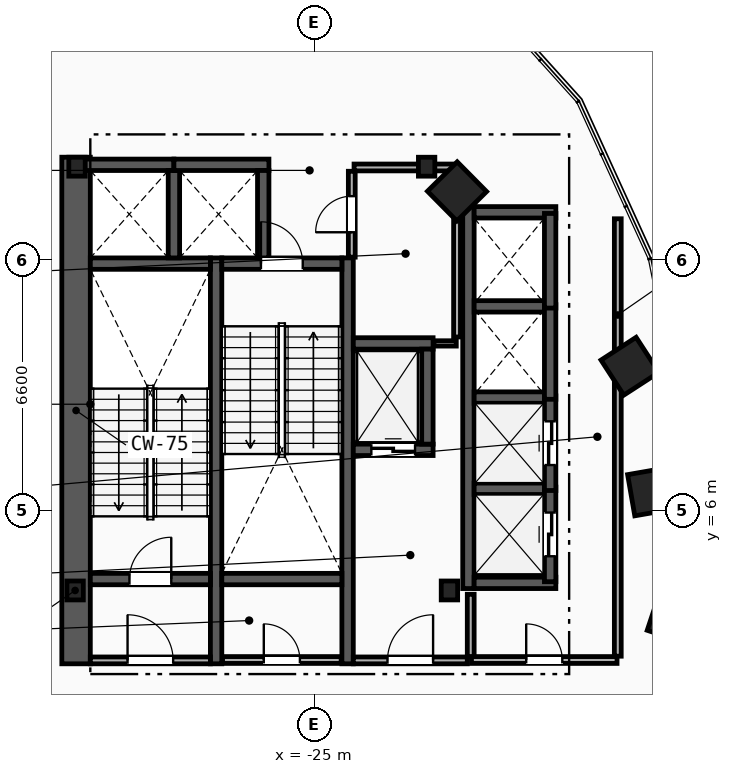
"""IFC4 building model, lengths in metres.
Left out: names, types, materials, properties, quantities, classifications, styles, units other than length and angle.
Written with IfcOpenShell. Run it as: python <this file> out.ifc"""

import sys

from ifc_helpers import new_model, si_unit, direction, frame, frame_2d, origin, origin_2d, place, context, subcontext, project, spatial, rectangle, i_section, extrude, element, fill, save


model = new_model("IFC4")
c1 = context("Model", 3, precision=1e-05, world=origin(), true_north=direction((0.0, 1.0)))
c2 = subcontext(c1, "Body", "Model", "MODEL_VIEW")
j1 = project(units=[si_unit("LENGTHUNIT", "METRE"), si_unit("PLANEANGLEUNIT", "RADIAN")], contexts=[c1])
p1 = place(None, origin())
s1 = spatial("IfcSite", under=j1, at=p1, CompositionType="ELEMENT")
p2 = place(p1, origin())
s2 = spatial("IfcBuilding", under=s1, at=p2, CompositionType="ELEMENT")
p3 = place(p2, frame((0.0, 0.0, 77.2)))
s3 = spatial("IfcBuildingStorey", under=s2, at=p3, CompositionType="ELEMENT", Elevation=77.2)
for number, where, z_axis, x_axis in (
    (1, (-31.3, 3.9, 0.0), (0.0, 0.0, 1.0), (1.0, 0.0, 0.0)),
    (2, (-21.45, 3.9, 0.0), (0.0, 0.0, 1.0), (1.0, 0.0, 0.0)),
    (3, (-22.05, 15.05, 0.0), (0.0, 0.0, 1.0), (1.0, 0.0, 0.0)),
    (4, (-31.25, 15.05, 0.0), (0.0, 0.0, 1.0), (1.0, 0.0, 0.0)),
):
    element("IfcColumn", number, at=place(p3, frame(where, z_axis=z_axis, x_axis=x_axis)), inside=s3, PredefinedType="COLUMN", context=c2, shape_type="SweptSolid", body=[
        extrude(i_section(OverallWidth=0.432, OverallDepth=0.498, WebThickness=0.056, FlangeThickness=0.089, FilletRadius=0.018, at=origin_2d()), origin(), (0.0, 0.0, 1.0), 4.6),
    ])
for number, where, z_axis, x_axis in (
    (5, (-15.55, 3.2, 0.0), (0.0, 0.0, 1.0), (0.315, 0.949, 0.0)),
    (6, (-16.125, 6.5, 0.0), (0.0, 0.0, 1.0), (-0.172, 0.985, 0.0)),
    (7, (-16.7, 9.8, 0.0), (0.0, 0.0, 1.0), (-0.544, 0.839, 0.0)),
    (8, (-21.25, 14.4, 0.0), (0.0, 0.0, 1.0), (-0.703, 0.711, 0.0)),
):
    element("IfcColumn", number, at=place(p3, frame(where, z_axis=z_axis, x_axis=x_axis)), inside=s3, PredefinedType="COLUMN", context=c2, shape_type="SweptSolid", body=[
        extrude(rectangle(XDim=1.1, YDim=1.1, at=origin_2d()), origin(), (0.0, 0.0, 1.0), 4.6),
    ])
p4 = place(p3, frame((-31.275, 1.97, 0.0), z_axis=(0.0, 0.0, 1.0), x_axis=(0.0, 1.0, 0.0)))
e9 = element("IfcWall", 9, at=p4, inside=s3, PredefinedType="SHEAR", context=c2, shape_type="SweptSolid", body=[
    extrude(rectangle(XDim=13.33, YDim=0.75, at=frame_2d((6.665, 0.0))), origin(), (0.0, 0.0, 1.0), 4.3),
])
for number, where, z_axis, x_axis in (
    (10, (-27.59, 1.97, 0.0), (0.0, 0.0, 1.0), (0.0, 1.0, 0.0)),
    (11, (-24.13, 1.97, 0.0), (0.0, 0.0, 1.0), (0.0, 1.0, 0.0)),
):
    element("IfcWall", number, at=place(p3, frame(where, z_axis=z_axis, x_axis=x_axis)), inside=s3, PredefinedType="SHEAR", context=c2, shape_type="SweptSolid", body=[
        extrude(rectangle(XDim=10.68, YDim=0.3, at=frame_2d((5.34, 0.0))), origin(), (0.0, 0.0, 1.0), 4.3),
    ])
p5 = place(p3, frame((-30.9, 4.2, 0.0), z_axis=(0.0, 0.0, 1.0), x_axis=(1.0, 0.0, 0.0)))
e12 = element("IfcWall", 12, at=p5, inside=s3, PredefinedType="SHEAR", context=c2, shape_type="SweptSolid", body=[
    extrude(rectangle(XDim=3.16, YDim=0.3, at=frame_2d((1.58, 0.0))), origin(), (0.0, 0.0, 1.0), 4.3),
])
p6 = place(p5, frame((1.03, 0.0, 0.0)))
e13 = element("IfcOpeningElement", 13, at=p6, cuts=e12, PredefinedType="OPENING", context=c2, shape_type="SweptSolid", body=[
    extrude(rectangle(XDim=1.1, YDim=2.15, at=frame_2d((0.55, 1.075))), frame((0.0, 0.16, 0.0), z_axis=(0.0, -1.0, 0.0), x_axis=(1.0, 0.0, 0.0)), (0.0, 0.0, 1.0), 0.32),
])
p7 = place(p3, frame((-30.9, 12.5, 0.0), z_axis=(0.0, 0.0, 1.0), x_axis=(1.0, 0.0, 0.0)))
e14 = element("IfcWall", 14, at=p7, inside=s3, PredefinedType="SHEAR", context=c2, shape_type="SweptSolid", body=[
    extrude(rectangle(XDim=3.16, YDim=0.3, at=frame_2d((1.58, 0.0))), origin(), (0.0, 0.0, 1.0), 4.3),
])
p8 = place(p3, frame((-27.44, 12.5, 0.0), z_axis=(0.0, 0.0, 1.0), x_axis=(1.0, 0.0, 0.0)))
e15 = element("IfcWall", 15, at=p8, inside=s3, PredefinedType="SHEAR", context=c2, shape_type="SweptSolid", body=[
    extrude(rectangle(XDim=3.16, YDim=0.3, at=frame_2d((1.58, 0.0))), origin(), (0.0, 0.0, 1.0), 4.3),
])
p9 = place(p8, frame((1.03, 0.0, 0.0)))
e16 = element("IfcOpeningElement", 16, at=p9, cuts=e15, PredefinedType="OPENING", context=c2, shape_type="SweptSolid", body=[
    extrude(rectangle(XDim=1.1, YDim=2.15, at=frame_2d((0.55, 1.075))), frame((0.0, 0.16, 0.0), z_axis=(0.0, -1.0, 0.0), x_axis=(1.0, 0.0, 0.0)), (0.0, 0.0, 1.0), 0.32),
])
p10 = place(p3, frame((-27.44, 4.2, 0.0), z_axis=(0.0, 0.0, 1.0), x_axis=(1.0, 0.0, 0.0)))
e17 = element("IfcWall", 17, at=p10, inside=s3, PredefinedType="SHEAR", context=c2, shape_type="SweptSolid", body=[
    extrude(rectangle(XDim=3.16, YDim=0.3, at=frame_2d((1.58, 0.0))), origin(), (0.0, 0.0, 1.0), 4.3),
])
p11 = place(p3, frame((-20.89, 2.15, 0.0), z_axis=(0.0, 0.0, 1.0), x_axis=(0.0, 1.0, 0.0)))
e18 = element("IfcWall", 18, at=p11, inside=s3, PredefinedType="PARTITIONING", context=c2, shape_type="SweptSolid", body=[
    extrude(rectangle(XDim=1.65, YDim=0.18, at=frame_2d((0.825, 0.0))), origin(), (0.0, 0.0, 1.0), 4.3),
])
p12 = place(p3, frame((-23.98, 2.06, 0.0), z_axis=(0.0, 0.0, 1.0), x_axis=(1.0, 0.0, 0.0)))
e19 = element("IfcWall", 19, at=p12, inside=s3, PredefinedType="PARTITIONING", context=c2, shape_type="SweptSolid", body=[
    extrude(rectangle(XDim=3.0, YDim=0.18, at=frame_2d((1.5, 0.0))), origin(), (0.0, 0.0, 1.0), 4.3),
])
p13 = place(p12, frame((0.9, 0.0, 0.0)))
e20 = element("IfcOpeningElement", 20, at=p13, cuts=e19, PredefinedType="OPENING", context=c2, shape_type="SweptSolid", body=[
    extrude(rectangle(XDim=1.2, YDim=2.15, at=frame_2d((0.6, 1.075))), frame((0.0, 0.1, 0.0), z_axis=(0.0, -1.0, 0.0), x_axis=(1.0, 0.0, 0.0)), (0.0, 0.0, 1.0), 0.2),
])
p14 = place(p3, frame((-30.9, 2.06, 0.0), z_axis=(0.0, 0.0, 1.0), x_axis=(1.0, 0.0, 0.0)))
e21 = element("IfcWall", 21, at=p14, inside=s3, PredefinedType="PARTITIONING", context=c2, shape_type="SweptSolid", body=[
    extrude(rectangle(XDim=3.16, YDim=0.18, at=frame_2d((1.58, 0.0))), origin(), (0.0, 0.0, 1.0), 4.3),
])
p15 = place(p14, frame((0.98, 0.0, 0.0)))
e22 = element("IfcOpeningElement", 22, at=p15, cuts=e21, PredefinedType="OPENING", context=c2, shape_type="SweptSolid", body=[
    extrude(rectangle(XDim=1.2, YDim=2.15, at=frame_2d((0.6, 1.075))), frame((0.0, 0.1, 0.0), z_axis=(0.0, -1.0, 0.0), x_axis=(1.0, 0.0, 0.0)), (0.0, 0.0, 1.0), 0.2),
])
p16 = place(p3, frame((-23.98, 7.6, 0.0), z_axis=(0.0, 0.0, 1.0), x_axis=(1.0, 0.0, 0.0)))
e23 = element("IfcWall", 23, at=p16, inside=s3, PredefinedType="SHEAR", context=c2, shape_type="SweptSolid", body=[
    extrude(rectangle(XDim=2.1, YDim=0.3, at=frame_2d((1.05, 0.0))), origin(), (0.0, 0.0, 1.0), 4.3),
])
p17 = place(p16, frame((0.475, 0.0, 0.0)))
e24 = element("IfcOpeningElement", 24, at=p17, cuts=e23, PredefinedType="OPENING", context=c2, shape_type="SweptSolid", body=[
    extrude(rectangle(XDim=1.15, YDim=2.2, at=frame_2d((0.575, 1.1))), frame((0.0, 0.16, 0.0), z_axis=(0.0, -1.0, 0.0), x_axis=(1.0, 0.0, 0.0)), (0.0, 0.0, 1.0), 0.32),
])
p18 = place(p3, frame((-23.98, 10.4, 0.0), z_axis=(0.0, 0.0, 1.0), x_axis=(1.0, 0.0, 0.0)))
e25 = element("IfcWall", 25, at=p18, inside=s3, PredefinedType="SHEAR", context=c2, shape_type="SweptSolid", body=[
    extrude(rectangle(XDim=2.1, YDim=0.3, at=frame_2d((1.05, 0.0))), origin(), (0.0, 0.0, 1.0), 4.3),
])
for number, where, z_axis, x_axis in (
    (26, (-22.03, 7.75, 0.0), (0.0, 0.0, 1.0), (0.0, 1.0, 0.0)),
    (27, (-31.2, 15.1, 0.0), (0.0, 0.0, 1.0), (1.0, 0.0, 0.0)),
):
    element("IfcWall", number, at=place(p3, frame(where, z_axis=z_axis, x_axis=x_axis)), inside=s3, PredefinedType="SHEAR", context=c2, shape_type="SweptSolid", body=[
        extrude(rectangle(XDim=2.5, YDim=0.3, at=frame_2d((1.25, 0.0))), origin(), (0.0, 0.0, 1.0), 4.3),
    ])
p19 = place(p3, frame((-28.7, 12.65, 0.0), z_axis=(0.0, 0.0, 1.0), x_axis=(0.0, 1.0, 0.0)))
e28 = element("IfcWall", 28, at=p19, inside=s3, PredefinedType="SHEAR", context=c2, shape_type="SweptSolid", body=[
    extrude(rectangle(XDim=2.3, YDim=0.3, at=frame_2d((1.15, 0.0))), origin(), (0.0, 0.0, 1.0), 4.3),
])
p20 = place(p3, frame((-28.7, 15.1, 0.0), z_axis=(0.0, 0.0, 1.0), x_axis=(1.0, 0.0, 0.0)))
e29 = element("IfcWall", 29, at=p20, inside=s3, PredefinedType="SHEAR", context=c2, shape_type="SweptSolid", body=[
    extrude(rectangle(XDim=2.5, YDim=0.3, at=frame_2d((1.25, 0.0))), origin(), (0.0, 0.0, 1.0), 4.3),
])
p21 = place(p3, frame((-26.35, 12.65, 0.0), z_axis=(0.0, 0.0, 1.0), x_axis=(0.0, 1.0, 0.0)))
e30 = element("IfcWall", 30, at=p21, inside=s3, PredefinedType="SHEAR", context=c2, shape_type="SweptSolid", body=[
    extrude(rectangle(XDim=2.3, YDim=0.3, at=frame_2d((1.15, 0.0))), origin(), (0.0, 0.0, 1.0), 4.3),
])
p22 = place(p3, frame((-20.95, 3.95, 0.0), z_axis=(0.0, 0.0, 1.0), x_axis=(0.0, 1.0, 0.0)))
e31 = element("IfcWall", 31, at=p22, inside=s3, PredefinedType="SHEAR", context=c2, shape_type="SweptSolid", body=[
    extrude(rectangle(XDim=10.05, YDim=0.3, at=frame_2d((5.025, 0.0))), origin(), (0.0, 0.0, 1.0), 4.3),
])
for number, where, z_axis, x_axis in (
    (32, (-20.8, 4.1, 0.0), (0.0, 0.0, 1.0), (1.0, 0.0, 0.0)),
    (33, (-20.8, 13.85, 0.0), (0.0, 0.0, 1.0), (1.0, 0.0, 0.0)),
):
    element("IfcWall", number, at=place(p3, frame(where, z_axis=z_axis, x_axis=x_axis)), inside=s3, PredefinedType="SHEAR", context=c2, shape_type="SweptSolid", body=[
        extrude(rectangle(XDim=2.15, YDim=0.3, at=frame_2d((1.075, 0.0))), origin(), (0.0, 0.0, 1.0), 4.3),
    ])
for number, where, z_axis, x_axis in (
    (34, (-20.8, 6.575, 0.0), (0.0, 0.0, 1.0), (1.0, 0.0, 0.0)),
    (35, (-20.8, 8.975, 0.0), (0.0, 0.0, 1.0), (1.0, 0.0, 0.0)),
    (36, (-20.8, 11.375, 0.0), (0.0, 0.0, 1.0), (1.0, 0.0, 0.0)),
):
    element("IfcWall", number, at=place(p3, frame(where, z_axis=z_axis, x_axis=x_axis)), inside=s3, PredefinedType="SHEAR", context=c2, shape_type="SweptSolid", body=[
        extrude(rectangle(XDim=1.85, YDim=0.3, at=frame_2d((0.925, 0.0))), origin(), (0.0, 0.0, 1.0), 4.3),
    ])
p23 = place(p3, frame((-18.8, 4.13, 0.0), z_axis=(0.0, 0.0, 1.0), x_axis=(0.0, 1.0, 0.0)))
e37 = element("IfcWall", 37, at=p23, inside=s3, PredefinedType="SHEAR", context=c2, shape_type="SweptSolid", body=[
    extrude(rectangle(XDim=2.49, YDim=0.3, at=frame_2d((1.245, 0.0))), origin(), (0.0, 0.0, 1.0), 4.3),
])
p24 = place(p23, frame((0.67, 0.0, 0.0)))
e38 = element("IfcOpeningElement", 38, at=p24, cuts=e37, PredefinedType="OPENING", context=c2, shape_type="SweptSolid", body=[
    extrude(rectangle(XDim=1.15, YDim=2.2, at=frame_2d((0.575, 1.1))), frame((0.0, 0.16, 0.0), z_axis=(0.0, -1.0, 0.0), x_axis=(1.0, 0.0, 0.0)), (0.0, 0.0, 1.0), 0.32),
])
p25 = place(p3, frame((-18.8, 6.53, 0.0), z_axis=(0.0, 0.0, 1.0), x_axis=(0.0, 1.0, 0.0)))
e39 = element("IfcWall", 39, at=p25, inside=s3, PredefinedType="SHEAR", context=c2, shape_type="SweptSolid", body=[
    extrude(rectangle(XDim=2.49, YDim=0.3, at=frame_2d((1.245, 0.0))), origin(), (0.0, 0.0, 1.0), 4.3),
])
p26 = place(p25, frame((0.67, 0.0, 0.0)))
e40 = element("IfcOpeningElement", 40, at=p26, cuts=e39, PredefinedType="OPENING", context=c2, shape_type="SweptSolid", body=[
    extrude(rectangle(XDim=1.15, YDim=2.2, at=frame_2d((0.575, 1.1))), frame((0.0, 0.16, 0.0), z_axis=(0.0, -1.0, 0.0), x_axis=(1.0, 0.0, 0.0)), (0.0, 0.0, 1.0), 0.32),
])
for number, where, z_axis, x_axis in (
    (41, (-18.8, 8.93, 0.0), (0.0, 0.0, 1.0), (0.0, 1.0, 0.0)),
    (42, (-18.8, 11.33, 0.0), (0.0, 0.0, 1.0), (0.0, 1.0, 0.0)),
):
    element("IfcWall", number, at=place(p3, frame(where, z_axis=z_axis, x_axis=x_axis)), inside=s3, PredefinedType="SHEAR", context=c2, shape_type="SweptSolid", body=[
        extrude(rectangle(XDim=2.49, YDim=0.3, at=frame_2d((1.245, 0.0))), origin(), (0.0, 0.0, 1.0), 4.3),
    ])
p27 = place(p3, frame((-17.02, 2.17, 0.0), z_axis=(0.0, 0.0, 1.0), x_axis=(0.0, 1.0, 0.0)))
e43 = element("IfcWall", 43, at=p27, inside=s3, PredefinedType="PARTITIONING", context=c2, shape_type="SweptSolid", body=[
    extrude(rectangle(XDim=11.51, YDim=0.18, at=frame_2d((5.755, 0.0))), origin(), (0.0, 0.0, 1.0), 4.3),
])
p28 = place(p3, frame((-20.87, 2.07, 0.0), z_axis=(0.0, 0.0, 1.0), x_axis=(1.0, 0.0, 0.0)))
e44 = element("IfcWall", 44, at=p28, inside=s3, PredefinedType="PARTITIONING", context=c2, shape_type="SweptSolid", body=[
    extrude(rectangle(XDim=3.83, YDim=0.18, at=frame_2d((1.915, 0.0))), origin(), (0.0, 0.0, 1.0), 4.3),
])
p29 = place(p28, frame((1.44, 0.0, 0.0)))
e45 = element("IfcOpeningElement", 45, at=p29, cuts=e44, PredefinedType="OPENING", context=c2, shape_type="SweptSolid", body=[
    extrude(rectangle(XDim=0.95, YDim=2.1, at=frame_2d((0.475, 1.05))), frame((0.0, 0.1, 0.0), z_axis=(0.0, -1.0, 0.0), x_axis=(1.0, 0.0, 0.0)), (0.0, 0.0, 1.0), 0.2),
])
p30 = place(p3, frame((-21.86, 10.4, 0.0), z_axis=(0.0, 0.0, 1.0), x_axis=(1.0, 0.0, 0.0)))
e46 = element("IfcWall", 46, at=p30, inside=s3, PredefinedType="PARTITIONING", context=c2, shape_type="SweptSolid", body=[
    extrude(rectangle(XDim=0.59, YDim=0.14, at=frame_2d((0.295, 0.0))), origin(), (0.0, 0.0, 1.0), 4.3),
])
p31 = place(p3, frame((-21.25, 10.57, 0.0), z_axis=(0.0, 0.0, 1.0), x_axis=(0.0, 1.0, 0.0)))
e47 = element("IfcWall", 47, at=p31, inside=s3, PredefinedType="PARTITIONING", context=c2, shape_type="SweptSolid", body=[
    extrude(rectangle(XDim=4.36, YDim=0.18, at=frame_2d((2.18, 0.0))), origin(), (0.0, 0.0, 1.0), 4.3),
])
p32 = place(p3, frame((-23.96, 15.03, 0.0), z_axis=(0.0, 0.0, 1.0), x_axis=(1.0, 0.0, 0.0)))
e48 = element("IfcWall", 48, at=p32, inside=s3, PredefinedType="PARTITIONING", context=c2, shape_type="SweptSolid", body=[
    extrude(rectangle(XDim=2.61, YDim=0.18, at=frame_2d((1.305, 0.0))), origin(), (0.0, 0.0, 1.0), 3.373),
])
p33 = place(p3, frame((-27.42, 2.07, 0.0), z_axis=(0.0, 0.0, 1.0), x_axis=(1.0, 0.0, 0.0)))
e49 = element("IfcWall", 49, at=p33, inside=s3, PredefinedType="PARTITIONING", context=c2, shape_type="SweptSolid", body=[
    extrude(rectangle(XDim=3.12, YDim=0.18, at=frame_2d((1.56, 0.0))), origin(), (0.0, 0.0, 1.0), 4.3),
])
p34 = place(p33, frame((1.085, 0.0, 0.0)))
e50 = element("IfcOpeningElement", 50, at=p34, cuts=e49, PredefinedType="OPENING", context=c2, shape_type="SweptSolid", body=[
    extrude(rectangle(XDim=0.95, YDim=2.1, at=frame_2d((0.475, 1.05))), frame((0.0, 0.1, 0.0), z_axis=(0.0, -1.0, 0.0), x_axis=(1.0, 0.0, 0.0)), (0.0, 0.0, 1.0), 0.2),
])
p35 = place(p3, frame((-24.02, 12.67, 0.0), z_axis=(0.0, 0.0, 1.0), x_axis=(0.0, 1.0, 0.0)))
e51 = element("IfcWall", 51, at=p35, inside=s3, PredefinedType="PARTITIONING", context=c2, shape_type="SweptSolid", body=[
    extrude(rectangle(XDim=2.26, YDim=0.18, at=frame_2d((1.13, 0.0))), origin(), (0.0, 0.0, 1.0), 4.3),
])
p36 = place(p35, frame((0.655, 0.0, 0.0)))
e52 = element("IfcOpeningElement", 52, at=p36, cuts=e51, PredefinedType="OPENING", context=c2, shape_type="SweptSolid", body=[
    extrude(rectangle(XDim=0.95, YDim=2.1, at=frame_2d((0.475, 1.05))), frame((0.0, 0.1, 0.0), z_axis=(0.0, -1.0, 0.0), x_axis=(1.0, 0.0, 0.0)), (0.0, 0.0, 1.0), 0.2),
])
p37 = place(p6, origin())
e53 = element("IfcDoor", 53, at=p37, inside=s3, OperationType="SINGLE_SWING_RIGHT", PredefinedType="DOOR", context=c2, shape_type="SweptSolid", body=[
    extrude(rectangle(XDim=1.1, YDim=2.15, at=frame_2d((0.55, 1.075))), frame((0.0, 0.025, 0.0), z_axis=(0.0, -1.0, 0.0), x_axis=(1.0, 0.0, 0.0)), (0.0, 0.0, 1.0), 0.05),
])
fill(e13, e53)
p38 = place(p9, origin())
e54 = element("IfcDoor", 54, at=p38, inside=s3, OperationType="SINGLE_SWING_LEFT", PredefinedType="DOOR", context=c2, shape_type="SweptSolid", body=[
    extrude(rectangle(XDim=1.1, YDim=2.15, at=frame_2d((0.55, 1.075))), frame((0.0, 0.025, 0.0), z_axis=(0.0, -1.0, 0.0), x_axis=(1.0, 0.0, 0.0)), (0.0, 0.0, 1.0), 0.05),
])
fill(e16, e54)
p39 = place(p13, origin())
e55 = element("IfcDoor", 55, at=p39, inside=s3, OperationType="SINGLE_SWING_RIGHT", PredefinedType="DOOR", context=c2, shape_type="SweptSolid", body=[
    extrude(rectangle(XDim=1.2, YDim=2.15, at=frame_2d((0.6, 1.075))), frame((0.0, 0.025, 0.0), z_axis=(0.0, -1.0, 0.0), x_axis=(1.0, 0.0, 0.0)), (0.0, 0.0, 1.0), 0.05),
])
fill(e20, e55)
p40 = place(p15, origin())
e56 = element("IfcDoor", 56, at=p40, inside=s3, OperationType="SINGLE_SWING_LEFT", PredefinedType="DOOR", context=c2, shape_type="SweptSolid", body=[
    extrude(rectangle(XDim=1.2, YDim=2.15, at=frame_2d((0.6, 1.075))), frame((0.0, 0.025, 0.0), z_axis=(0.0, -1.0, 0.0), x_axis=(1.0, 0.0, 0.0)), (0.0, 0.0, 1.0), 0.05),
])
fill(e22, e56)
p41 = place(p17, origin())
e57 = element("IfcDoor", 57, at=p41, inside=s3, OperationType="SLIDING_TO_LEFT", PredefinedType="TRAPDOOR", context=c2, shape_type="SweptSolid", body=[
    extrude(rectangle(XDim=1.15, YDim=2.2, at=frame_2d((0.575, 1.1))), frame((0.0, 0.025, 0.0), z_axis=(0.0, -1.0, 0.0), x_axis=(1.0, 0.0, 0.0)), (0.0, 0.0, 1.0), 0.05),
])
fill(e24, e57)
p42 = place(p24, origin())
e58 = element("IfcDoor", 58, at=p42, inside=s3, OperationType="SLIDING_TO_LEFT", PredefinedType="TRAPDOOR", context=c2, shape_type="SweptSolid", body=[
    extrude(rectangle(XDim=1.15, YDim=2.2, at=frame_2d((0.575, 1.1))), frame((0.0, 0.025, 0.0), z_axis=(0.0, -1.0, 0.0), x_axis=(1.0, 0.0, 0.0)), (0.0, 0.0, 1.0), 0.05),
])
fill(e38, e58)
p43 = place(p26, origin())
e59 = element("IfcDoor", 59, at=p43, inside=s3, OperationType="SLIDING_TO_LEFT", PredefinedType="TRAPDOOR", context=c2, shape_type="SweptSolid", body=[
    extrude(rectangle(XDim=1.15, YDim=2.2, at=frame_2d((0.575, 1.1))), frame((0.0, 0.025, 0.0), z_axis=(0.0, -1.0, 0.0), x_axis=(1.0, 0.0, 0.0)), (0.0, 0.0, 1.0), 0.05),
])
fill(e40, e59)
p44 = place(p29, origin())
e60 = element("IfcDoor", 60, at=p44, inside=s3, OperationType="SINGLE_SWING_LEFT", PredefinedType="DOOR", context=c2, shape_type="SweptSolid", body=[
    extrude(rectangle(XDim=0.95, YDim=2.1, at=frame_2d((0.475, 1.05))), frame((0.0, 0.025, 0.0), z_axis=(0.0, -1.0, 0.0), x_axis=(1.0, 0.0, 0.0)), (0.0, 0.0, 1.0), 0.05),
])
fill(e45, e60)
p45 = place(p34, origin())
e61 = element("IfcDoor", 61, at=p45, inside=s3, OperationType="SINGLE_SWING_LEFT", PredefinedType="DOOR", context=c2, shape_type="SweptSolid", body=[
    extrude(rectangle(XDim=0.95, YDim=2.1, at=frame_2d((0.475, 1.05))), frame((0.0, 0.025, 0.0), z_axis=(0.0, -1.0, 0.0), x_axis=(1.0, 0.0, 0.0)), (0.0, 0.0, 1.0), 0.05),
])
fill(e50, e61)
p46 = place(p36, origin())
e62 = element("IfcDoor", 62, at=p46, inside=s3, OperationType="SINGLE_SWING_LEFT", PredefinedType="DOOR", context=c2, shape_type="SweptSolid", body=[
    extrude(rectangle(XDim=0.95, YDim=2.1, at=frame_2d((0.475, 1.05))), frame((0.0, 0.025, 0.0), z_axis=(0.0, -1.0, 0.0), x_axis=(1.0, 0.0, 0.0)), (0.0, 0.0, 1.0), 0.05),
])
fill(e52, e62)
save(model, sys.argv[1])
